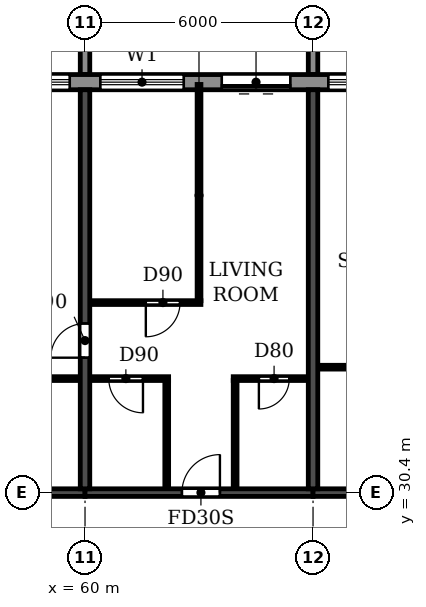
"""IFC4 building model, lengths in metres.
Left out: names, types, materials, properties, quantities, classifications, styles, units other than length and angle.
Written with IfcOpenShell. Run it as: python <this file> out.ifc"""

import sys

from ifc_helpers import new_model, si_unit, direction, frame, frame_2d, origin, place, context, subcontext, project, spatial, polyline, rectangle, outline, extrude, source, transform, mapped, element, fill, save


model = new_model("IFC4")
c1 = context("Model", 3, precision=1e-05, world=origin(), true_north=direction((0.0, 1.0)))
c2 = subcontext(c1, "Body", "Model", "MODEL_VIEW")
j1 = project(units=[si_unit("LENGTHUNIT", "METRE"), si_unit("PLANEANGLEUNIT", "RADIAN")], contexts=[c1])
p1 = place(None, origin())
s1 = spatial("IfcSite", under=j1, at=p1, CompositionType="ELEMENT")
p2 = place(p1, origin())
s2 = spatial("IfcBuilding", under=s1, at=p2, CompositionType="ELEMENT")
p3 = place(p2, frame((0.0, 0.0, 231.3)))
s3 = spatial("IfcBuildingStorey", under=s2, at=p3, CompositionType="ELEMENT", Elevation=231.3)
p4 = place(p3, frame((60.0, 30.5, 0.0), z_axis=(0.0, 0.0, 1.0), x_axis=(0.0, 1.0, 0.0)))
e1 = element("IfcWall", 1, at=p4, inside=s3, PredefinedType="SHEAR", context=c2, shape_type="SweptSolid", body=[
    extrude(rectangle(XDim=10.5, YDim=0.25, at=frame_2d((5.25, 0.0))), origin(), (0.0, 0.0, 1.0), 3.08),
])
p5 = place(p4, frame((3.45, 0.0, 0.0)))
e2 = element("IfcOpeningElement", 2, at=p5, cuts=e1, PredefinedType="OPENING", context=c2, shape_type="SweptSolid", body=[
    extrude(rectangle(XDim=0.9, YDim=2.1, at=frame_2d((0.45, 1.05))), frame((0.0, 0.135, 0.0), z_axis=(0.0, -1.0, 0.0), x_axis=(1.0, 0.0, 0.0)), (0.0, 0.0, 1.0), 0.27),
])
p6 = place(p3, frame((66.0, 30.5, 0.0), z_axis=(0.0, 0.0, 1.0), x_axis=(0.0, 1.0, 0.0)))
e3 = element("IfcWall", 3, at=p6, inside=s3, PredefinedType="SHEAR", context=c2, shape_type="SweptSolid", body=[
    extrude(rectangle(XDim=10.5, YDim=0.25, at=frame_2d((5.25, 0.0))), origin(), (0.0, 0.0, 1.0), 3.08),
])
p7 = place(p3, frame((54.0, 30.4, 0.0), z_axis=(0.0, 0.0, 1.0), x_axis=(1.0, 0.0, 0.0)))
e4 = element("IfcWall", 4, at=p7, inside=s3, PredefinedType="SHEAR", context=c2, shape_type="SweptSolid", body=[
    extrude(rectangle(XDim=6.0, YDim=0.2, at=frame_2d((3.0, 0.0))), origin(), (0.0, 0.0, 1.0), 2.48),
])
p8 = place(p3, frame((60.0, 30.4, 0.0), z_axis=(0.0, 0.0, 1.0), x_axis=(1.0, 0.0, 0.0)))
e5 = element("IfcWall", 5, at=p8, inside=s3, PredefinedType="SHEAR", context=c2, shape_type="SweptSolid", body=[
    extrude(rectangle(XDim=6.0, YDim=0.2, at=frame_2d((3.0, 0.0))), origin(), (0.0, 0.0, 1.0), 2.48),
])
p9 = place(p8, frame((2.55, 0.0, 0.0)))
e6 = element("IfcOpeningElement", 6, at=p9, cuts=e5, PredefinedType="OPENING", context=c2, shape_type="SweptSolid", body=[
    extrude(rectangle(XDim=1.0, YDim=2.1, at=frame_2d((0.5, 1.05))), frame((0.0, 0.11, 0.0), z_axis=(0.0, -1.0, 0.0), x_axis=(1.0, 0.0, 0.0)), (0.0, 0.0, 1.0), 0.22),
])
p10 = place(p3, frame((66.0, 30.4, 0.0), z_axis=(0.0, 0.0, 1.0), x_axis=(1.0, 0.0, 0.0)))
e7 = element("IfcWall", 7, at=p10, inside=s3, PredefinedType="SHEAR", context=c2, shape_type="SweptSolid", body=[
    extrude(rectangle(XDim=6.0, YDim=0.2, at=frame_2d((3.0, 0.0))), origin(), (0.0, 0.0, 1.0), 2.48),
])
p11 = place(p10, frame((2.55, 0.0, 0.0)))
e8 = element("IfcOpeningElement", 8, at=p11, cuts=e7, PredefinedType="OPENING", context=c2, shape_type="SweptSolid", body=[
    extrude(rectangle(XDim=1.0, YDim=2.1, at=frame_2d((0.5, 1.05))), frame((0.0, 0.11, 0.0), z_axis=(0.0, -1.0, 0.0), x_axis=(1.0, 0.0, 0.0)), (0.0, 0.0, 1.0), 0.22),
])
p12 = place(p3, frame((79.317, 41.2, 0.0), z_axis=(0.0, 0.0, 1.0), x_axis=(-1.0, 0.0, 0.0)))
e9 = element("IfcWall", 9, at=p12, inside=s3, PredefinedType="STANDARD", context=c2, shape_type="SweptSolid", body=[
    extrude(rectangle(XDim=56.634, YDim=0.4, at=frame_2d((28.317, 0.0))), origin(), (0.0, 0.0, 1.0), 3.08),
])
p13 = place(p12, frame((52.917, 0.0, 0.0)))
e10 = element("IfcOpeningElement", 10, at=p13, cuts=e9, PredefinedType="OPENING", context=c2, shape_type="SweptSolid", body=[
    extrude(rectangle(XDim=1.8, YDim=2.4, at=frame_2d((0.9, 1.2))), frame((0.0, 0.21, 0.0), z_axis=(0.0, -1.0, 0.0), x_axis=(1.0, 0.0, 0.0)), (0.0, 0.0, 1.0), 0.42),
])
p14 = place(p12, frame((49.717, 0.0, 0.9)))
e11 = element("IfcOpeningElement", 11, at=p14, cuts=e9, PredefinedType="OPENING", context=c2, shape_type="SweptSolid", body=[
    extrude(rectangle(XDim=2.2, YDim=1.5, at=frame_2d((1.1, 0.75))), frame((0.0, 0.21, 0.0), z_axis=(0.0, -1.0, 0.0), x_axis=(1.0, 0.0, 0.0)), (0.0, 0.0, 1.0), 0.42),
])
p15 = place(p12, frame((46.717, 0.0, 0.9)))
e12 = element("IfcOpeningElement", 12, at=p15, cuts=e9, PredefinedType="OPENING", context=c2, shape_type="SweptSolid", body=[
    extrude(rectangle(XDim=2.2, YDim=1.5, at=frame_2d((1.1, 0.75))), frame((0.0, 0.21, 0.0), z_axis=(0.0, -1.0, 0.0), x_axis=(1.0, 0.0, 0.0)), (0.0, 0.0, 1.0), 0.42),
])
p16 = place(p12, frame((43.717, 0.0, 0.9)))
e13 = element("IfcOpeningElement", 13, at=p16, cuts=e9, PredefinedType="OPENING", context=c2, shape_type="SweptSolid", body=[
    extrude(rectangle(XDim=2.2, YDim=1.5, at=frame_2d((1.1, 0.75))), frame((0.0, 0.21, 0.0), z_axis=(0.0, -1.0, 0.0), x_axis=(1.0, 0.0, 0.0)), (0.0, 0.0, 1.0), 0.42),
])
p17 = place(p12, frame((40.717, 0.0, 0.9)))
e14 = element("IfcOpeningElement", 14, at=p17, cuts=e9, PredefinedType="OPENING", context=c2, shape_type="SweptSolid", body=[
    extrude(rectangle(XDim=2.2, YDim=1.5, at=frame_2d((1.1, 0.75))), frame((0.0, 0.21, 0.0), z_axis=(0.0, -1.0, 0.0), x_axis=(1.0, 0.0, 0.0)), (0.0, 0.0, 1.0), 0.42),
])
p18 = place(p12, frame((37.917, 0.0, 0.0)))
e15 = element("IfcOpeningElement", 15, at=p18, cuts=e9, PredefinedType="OPENING", context=c2, shape_type="SweptSolid", body=[
    extrude(rectangle(XDim=1.8, YDim=2.4, at=frame_2d((0.9, 1.2))), frame((0.0, 0.21, 0.0), z_axis=(0.0, -1.0, 0.0), x_axis=(1.0, 0.0, 0.0)), (0.0, 0.0, 1.0), 0.42),
])
p19 = place(p12, frame((34.717, 0.0, 0.9)))
e16 = element("IfcOpeningElement", 16, at=p19, cuts=e9, PredefinedType="OPENING", context=c2, shape_type="SweptSolid", body=[
    extrude(rectangle(XDim=2.2, YDim=1.5, at=frame_2d((1.1, 0.75))), frame((0.0, 0.21, 0.0), z_axis=(0.0, -1.0, 0.0), x_axis=(1.0, 0.0, 0.0)), (0.0, 0.0, 1.0), 0.42),
])
p20 = place(p12, frame((31.917, 0.0, 0.0)))
e17 = element("IfcOpeningElement", 17, at=p20, cuts=e9, PredefinedType="OPENING", context=c2, shape_type="SweptSolid", body=[
    extrude(rectangle(XDim=1.8, YDim=2.4, at=frame_2d((0.9, 1.2))), frame((0.0, 0.21, 0.0), z_axis=(0.0, -1.0, 0.0), x_axis=(1.0, 0.0, 0.0)), (0.0, 0.0, 1.0), 0.42),
])
p21 = place(p12, frame((28.717, 0.0, 0.9)))
e18 = element("IfcOpeningElement", 18, at=p21, cuts=e9, PredefinedType="OPENING", context=c2, shape_type="SweptSolid", body=[
    extrude(rectangle(XDim=2.2, YDim=1.5, at=frame_2d((1.1, 0.75))), frame((0.0, 0.21, 0.0), z_axis=(0.0, -1.0, 0.0), x_axis=(1.0, 0.0, 0.0)), (0.0, 0.0, 1.0), 0.42),
])
p22 = place(p12, frame((25.917, 0.0, 0.0)))
e19 = element("IfcOpeningElement", 19, at=p22, cuts=e9, PredefinedType="OPENING", context=c2, shape_type="SweptSolid", body=[
    extrude(rectangle(XDim=1.8, YDim=2.4, at=frame_2d((0.9, 1.2))), frame((0.0, 0.21, 0.0), z_axis=(0.0, -1.0, 0.0), x_axis=(1.0, 0.0, 0.0)), (0.0, 0.0, 1.0), 0.42),
])
p23 = place(p12, frame((22.717, 0.0, 0.9)))
e20 = element("IfcOpeningElement", 20, at=p23, cuts=e9, PredefinedType="OPENING", context=c2, shape_type="SweptSolid", body=[
    extrude(rectangle(XDim=2.2, YDim=1.5, at=frame_2d((1.1, 0.75))), frame((0.0, 0.21, 0.0), z_axis=(0.0, -1.0, 0.0), x_axis=(1.0, 0.0, 0.0)), (0.0, 0.0, 1.0), 0.42),
])
p24 = place(p12, frame((19.717, 0.0, 0.9)))
e21 = element("IfcOpeningElement", 21, at=p24, cuts=e9, PredefinedType="OPENING", context=c2, shape_type="SweptSolid", body=[
    extrude(rectangle(XDim=2.2, YDim=1.5, at=frame_2d((1.1, 0.75))), frame((0.0, 0.21, 0.0), z_axis=(0.0, -1.0, 0.0), x_axis=(1.0, 0.0, 0.0)), (0.0, 0.0, 1.0), 0.42),
])
p25 = place(p12, frame((16.717, 0.0, 0.9)))
e22 = element("IfcOpeningElement", 22, at=p25, cuts=e9, PredefinedType="OPENING", context=c2, shape_type="SweptSolid", body=[
    extrude(rectangle(XDim=2.2, YDim=1.5, at=frame_2d((1.1, 0.75))), frame((0.0, 0.21, 0.0), z_axis=(0.0, -1.0, 0.0), x_axis=(1.0, 0.0, 0.0)), (0.0, 0.0, 1.0), 0.42),
])
p26 = place(p12, frame((13.917, 0.0, 0.0)))
e23 = element("IfcOpeningElement", 23, at=p26, cuts=e9, PredefinedType="OPENING", context=c2, shape_type="SweptSolid", body=[
    extrude(rectangle(XDim=1.8, YDim=2.4, at=frame_2d((0.9, 1.2))), frame((0.0, 0.21, 0.0), z_axis=(0.0, -1.0, 0.0), x_axis=(1.0, 0.0, 0.0)), (0.0, 0.0, 1.0), 0.42),
])
p27 = place(p12, frame((10.717, 0.0, 0.9)))
e24 = element("IfcOpeningElement", 24, at=p27, cuts=e9, PredefinedType="OPENING", context=c2, shape_type="SweptSolid", body=[
    extrude(rectangle(XDim=2.2, YDim=1.5, at=frame_2d((1.1, 0.75))), frame((0.0, 0.21, 0.0), z_axis=(0.0, -1.0, 0.0), x_axis=(1.0, 0.0, 0.0)), (0.0, 0.0, 1.0), 0.42),
])
p28 = place(p12, frame((7.917, 0.0, 0.0)))
e25 = element("IfcOpeningElement", 25, at=p28, cuts=e9, PredefinedType="OPENING", context=c2, shape_type="SweptSolid", body=[
    extrude(rectangle(XDim=1.8, YDim=2.4, at=frame_2d((0.9, 1.2))), frame((0.0, 0.21, 0.0), z_axis=(0.0, -1.0, 0.0), x_axis=(1.0, 0.0, 0.0)), (0.0, 0.0, 1.0), 0.42),
])
p29 = place(p12, frame((4.717, 0.0, 0.9)))
e26 = element("IfcOpeningElement", 26, at=p29, cuts=e9, PredefinedType="OPENING", context=c2, shape_type="SweptSolid", body=[
    extrude(rectangle(XDim=2.2, YDim=1.5, at=frame_2d((1.1, 0.75))), frame((0.0, 0.21, 0.0), z_axis=(0.0, -1.0, 0.0), x_axis=(1.0, 0.0, 0.0)), (0.0, 0.0, 1.0), 0.42),
])
p30 = place(p12, frame((1.917, 0.0, 0.0)))
e27 = element("IfcOpeningElement", 27, at=p30, cuts=e9, PredefinedType="OPENING", context=c2, shape_type="SweptSolid", body=[
    extrude(rectangle(XDim=1.8, YDim=2.4, at=frame_2d((0.9, 1.2))), frame((0.0, 0.21, 0.0), z_axis=(0.0, -1.0, 0.0), x_axis=(1.0, 0.0, 0.0)), (0.0, 0.0, 1.0), 0.42),
])
m1 = source(origin(), c2, "Body", "SweptSolid", [
    extrude(outline(polyline([(0.0, 0.0), (0.25, 0.0), (0.25, 3.1), (0.0, 3.1), (0.0, 0.0)])), origin(), (0.0, 0.0, 1.0), 3.1),
])
for number, where in (
    (28, (59.875, 41.4, 0.0)),
    (29, (65.875, 41.4, 0.0)),
):
    element("IfcWall", number, at=place(p3, frame(where)), inside=s3, PredefinedType="STANDARD", context=c2, shape_type="MappedRepresentation", body=[
        mapped(m1, transform((0.0, 0.0, 0.0))),
    ])
p31 = place(p3, frame((57.1, 33.4, 0.0), z_axis=(0.0, 0.0, 1.0), x_axis=(1.0, 0.0, 0.0)))
e30 = element("IfcWall", 30, at=p31, inside=s3, PredefinedType="PARTITIONING", context=c2, shape_type="SweptSolid", body=[
    extrude(rectangle(XDim=2.765, YDim=0.1, at=frame_2d((1.382, 0.0))), origin(), (0.0, 0.0, 1.0), 3.08),
])
p32 = place(p31, frame((1.0, 0.0, 0.0)))
e31 = element("IfcOpeningElement", 31, at=p32, cuts=e30, PredefinedType="OPENING", context=c2, shape_type="SweptSolid", body=[
    extrude(rectangle(XDim=0.8, YDim=2.1, at=frame_2d((0.4, 1.05))), frame((0.0, 0.06, 0.0), z_axis=(0.0, -1.0, 0.0), x_axis=(1.0, 0.0, 0.0)), (0.0, 0.0, 1.0), 0.12),
])
p33 = place(p3, frame((60.135, 33.4, 0.0), z_axis=(0.0, 0.0, 1.0), x_axis=(1.0, 0.0, 0.0)))
e32 = element("IfcWall", 32, at=p33, inside=s3, PredefinedType="PARTITIONING", context=c2, shape_type="SweptSolid", body=[
    extrude(rectangle(XDim=2.065, YDim=0.1, at=frame_2d((1.032, 0.0))), origin(), (0.0, 0.0, 1.0), 3.08),
])
p34 = place(p33, frame((0.49, 0.0, 0.0)))
e33 = element("IfcOpeningElement", 33, at=p34, cuts=e32, PredefinedType="OPENING", context=c2, shape_type="SweptSolid", body=[
    extrude(rectangle(XDim=0.9, YDim=2.1, at=frame_2d((0.45, 1.05))), frame((0.0, 0.06, 0.0), z_axis=(0.0, -1.0, 0.0), x_axis=(1.0, 0.0, 0.0)), (0.0, 0.0, 1.0), 0.12),
])
p35 = place(p3, frame((63.9, 33.4, 0.0), z_axis=(0.0, 0.0, 1.0), x_axis=(1.0, 0.0, 0.0)))
e34 = element("IfcWall", 34, at=p35, inside=s3, PredefinedType="PARTITIONING", context=c2, shape_type="SweptSolid", body=[
    extrude(rectangle(XDim=1.965, YDim=0.1, at=frame_2d((0.982, 0.0))), origin(), (0.0, 0.0, 1.0), 3.08),
])
p36 = place(p35, frame((0.675, 0.0, 0.0)))
e35 = element("IfcOpeningElement", 35, at=p36, cuts=e34, PredefinedType="OPENING", context=c2, shape_type="SweptSolid", body=[
    extrude(rectangle(XDim=0.8, YDim=2.1, at=frame_2d((0.4, 1.05))), frame((0.0, 0.06, 0.0), z_axis=(0.0, -1.0, 0.0), x_axis=(1.0, 0.0, 0.0)), (0.0, 0.0, 1.0), 0.12),
])
p37 = place(p3, frame((66.135, 33.7, 0.0), z_axis=(0.0, 0.0, 1.0), x_axis=(1.0, 0.0, 0.0)))
e36 = element("IfcWall", 36, at=p37, inside=s3, PredefinedType="PARTITIONING", context=c2, shape_type="SweptSolid", body=[
    extrude(rectangle(XDim=2.065, YDim=0.1, at=frame_2d((1.032, 0.0))), origin(), (0.0, 0.0, 1.0), 3.08),
])
p38 = place(p3, frame((60.135, 35.4, 0.0), z_axis=(0.0, 0.0, 1.0), x_axis=(1.0, 0.0, 0.0)))
e37 = element("IfcWall", 37, at=p38, inside=s3, PredefinedType="PARTITIONING", context=c2, shape_type="SweptSolid", body=[
    extrude(rectangle(XDim=2.915, YDim=0.1, at=frame_2d((1.458, 0.0))), origin(), (0.0, 0.0, 1.0), 3.08),
])
p39 = place(p38, frame((1.465, 0.0, 0.0)))
e38 = element("IfcOpeningElement", 38, at=p39, cuts=e37, PredefinedType="OPENING", context=c2, shape_type="SweptSolid", body=[
    extrude(rectangle(XDim=0.9, YDim=2.1, at=frame_2d((0.45, 1.05))), frame((0.0, 0.06, 0.0), z_axis=(0.0, -1.0, 0.0), x_axis=(1.0, 0.0, 0.0)), (0.0, 0.0, 1.0), 0.12),
])
p40 = place(p3, frame((62.15, 30.51, 0.0), z_axis=(0.0, 0.0, 1.0), x_axis=(0.0, 1.0, 0.0)))
e39 = element("IfcWall", 39, at=p40, inside=s3, PredefinedType="PARTITIONING", context=c2, shape_type="SweptSolid", body=[
    extrude(rectangle(XDim=2.84, YDim=0.1, at=frame_2d((1.42, 0.0))), origin(), (0.0, 0.0, 1.0), 3.08),
])
p41 = place(p3, frame((63.0, 35.45, 0.0), z_axis=(0.0, 0.0, 1.0), x_axis=(0.0, 1.0, 0.0)))
e40 = element("IfcWall", 40, at=p41, inside=s3, PredefinedType="PARTITIONING", context=c2, shape_type="SweptSolid", body=[
    extrude(rectangle(XDim=5.69, YDim=0.1, at=frame_2d((2.845, 0.0))), origin(), (0.0, 0.0, 1.0), 3.08),
])
p42 = place(p3, frame((63.95, 30.51, 0.0), z_axis=(0.0, 0.0, 1.0), x_axis=(0.0, 1.0, 0.0)))
e41 = element("IfcWall", 41, at=p42, inside=s3, PredefinedType="PARTITIONING", context=c2, shape_type="SweptSolid", body=[
    extrude(rectangle(XDim=2.84, YDim=0.1, at=frame_2d((1.42, 0.0))), origin(), (0.0, 0.0, 1.0), 3.08),
])
p43 = place(p24, origin())
e42 = element("IfcWindow", 42, at=p43, inside=s3, PartitioningType="DOUBLE_PANEL_HORIZONTAL", PredefinedType="WINDOW", context=c2, shape_type="SweptSolid", body=[
    extrude(rectangle(XDim=2.2, YDim=1.5, at=frame_2d((1.1, 0.75))), frame((0.0, 0.03, 0.0), z_axis=(0.0, -1.0, 0.0), x_axis=(1.0, 0.0, 0.0)), (0.0, 0.0, 1.0), 0.06),
])
fill(e21, e42)
p44 = place(p25, origin())
e43 = element("IfcWindow", 43, at=p44, inside=s3, PartitioningType="DOUBLE_PANEL_HORIZONTAL", PredefinedType="WINDOW", context=c2, shape_type="SweptSolid", body=[
    extrude(rectangle(XDim=2.2, YDim=1.5, at=frame_2d((1.1, 0.75))), frame((0.0, 0.03, 0.0), z_axis=(0.0, -1.0, 0.0), x_axis=(1.0, 0.0, 0.0)), (0.0, 0.0, 1.0), 0.06),
])
fill(e22, e43)
p45 = place(p26, origin())
e44 = element("IfcDoor", 44, at=p45, inside=s3, OperationType="DOUBLE_DOOR_SLIDING", PredefinedType="DOOR", context=c2, shape_type="SweptSolid", body=[
    extrude(rectangle(XDim=1.8, YDim=2.4, at=frame_2d((0.9, 1.2))), frame((0.0, 0.025, 0.0), z_axis=(0.0, -1.0, 0.0), x_axis=(1.0, 0.0, 0.0)), (0.0, 0.0, 1.0), 0.05),
])
fill(e23, e44)
p46 = place(p27, origin())
e45 = element("IfcWindow", 45, at=p46, inside=s3, PartitioningType="DOUBLE_PANEL_HORIZONTAL", PredefinedType="WINDOW", context=c2, shape_type="SweptSolid", body=[
    extrude(rectangle(XDim=2.2, YDim=1.5, at=frame_2d((1.1, 0.75))), frame((0.0, 0.03, 0.0), z_axis=(0.0, -1.0, 0.0), x_axis=(1.0, 0.0, 0.0)), (0.0, 0.0, 1.0), 0.06),
])
fill(e24, e45)
p47 = place(p5, origin())
e46 = element("IfcDoor", 46, at=p47, inside=s3, OperationType="SINGLE_SWING_LEFT", PredefinedType="DOOR", context=c2, shape_type="SweptSolid", body=[
    extrude(rectangle(XDim=0.9, YDim=2.1, at=frame_2d((0.45, 1.05))), frame((0.0, 0.025, 0.0), z_axis=(0.0, -1.0, 0.0), x_axis=(1.0, 0.0, 0.0)), (0.0, 0.0, 1.0), 0.05),
])
fill(e2, e46)
p48 = place(p34, frame((0.9, 0.0, 0.0), z_axis=(0.0, 0.0, 1.0), x_axis=(-1.0, 0.0, 0.0)))
e47 = element("IfcDoor", 47, at=p48, inside=s3, OperationType="SINGLE_SWING_LEFT", PredefinedType="DOOR", context=c2, shape_type="SweptSolid", body=[
    extrude(rectangle(XDim=0.9, YDim=2.1, at=frame_2d((0.45, 1.05))), frame((0.0, 0.025, 0.0), z_axis=(0.0, -1.0, 0.0), x_axis=(1.0, 0.0, 0.0)), (0.0, 0.0, 1.0), 0.05),
])
fill(e33, e47)
p49 = place(p39, frame((0.9, 0.0, 0.0), z_axis=(0.0, 0.0, 1.0), x_axis=(-1.0, 0.0, 0.0)))
e48 = element("IfcDoor", 48, at=p49, inside=s3, OperationType="SINGLE_SWING_RIGHT", PredefinedType="DOOR", context=c2, shape_type="SweptSolid", body=[
    extrude(rectangle(XDim=0.9, YDim=2.1, at=frame_2d((0.45, 1.05))), frame((0.0, 0.025, 0.0), z_axis=(0.0, -1.0, 0.0), x_axis=(1.0, 0.0, 0.0)), (0.0, 0.0, 1.0), 0.05),
])
fill(e38, e48)
p50 = place(p9, origin())
e49 = element("IfcDoor", 49, at=p50, inside=s3, OperationType="SINGLE_SWING_RIGHT", PredefinedType="DOOR", context=c2, shape_type="SweptSolid", body=[
    extrude(rectangle(XDim=1.0, YDim=2.1, at=frame_2d((0.5, 1.05))), frame((0.0, 0.025, 0.0), z_axis=(0.0, -1.0, 0.0), x_axis=(1.0, 0.0, 0.0)), (0.0, 0.0, 1.0), 0.05),
])
fill(e6, e49)
p51 = place(p36, frame((0.8, 0.0, 0.0), z_axis=(0.0, 0.0, 1.0), x_axis=(-1.0, 0.0, 0.0)))
e50 = element("IfcDoor", 50, at=p51, inside=s3, OperationType="SINGLE_SWING_RIGHT", PredefinedType="DOOR", context=c2, shape_type="SweptSolid", body=[
    extrude(rectangle(XDim=0.8, YDim=2.1, at=frame_2d((0.4, 1.05))), frame((0.0, 0.025, 0.0), z_axis=(0.0, -1.0, 0.0), x_axis=(1.0, 0.0, 0.0)), (0.0, 0.0, 1.0), 0.05),
])
fill(e35, e50)
save(model, sys.argv[1])
